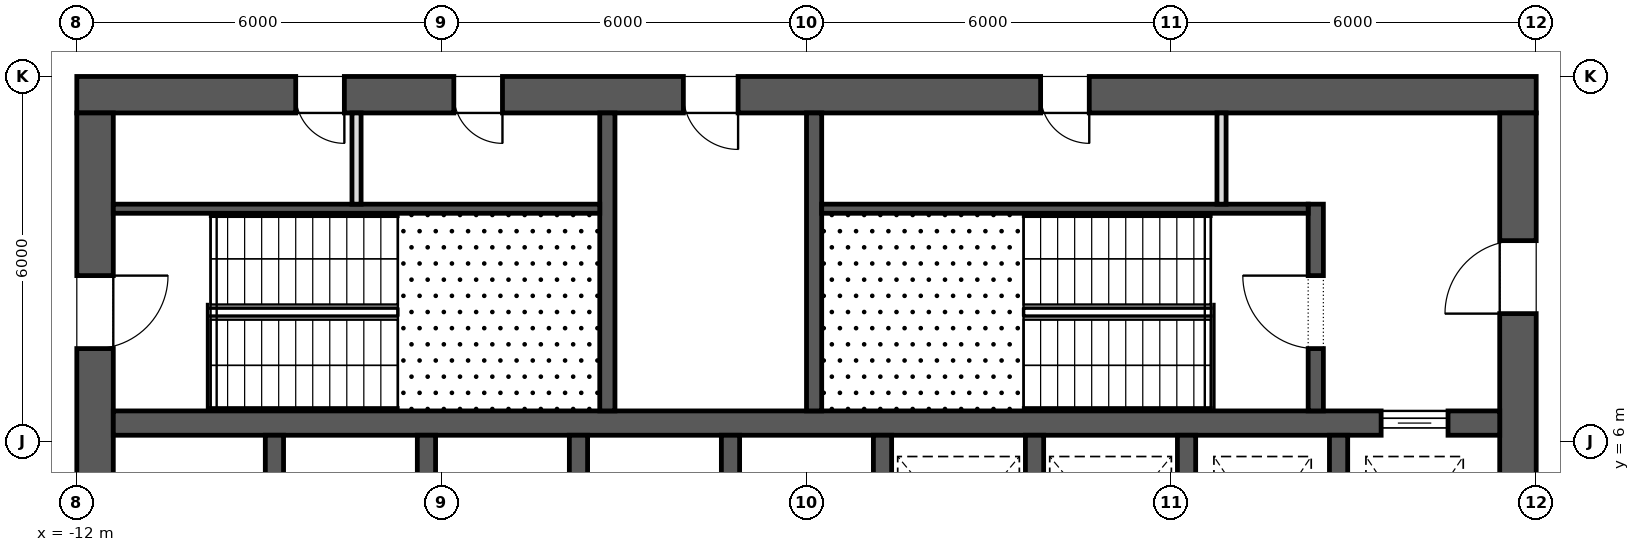
"""IFC4 building model, lengths in metres.
Left out: names, types, materials, properties, quantities, classifications, styles, units other than length and angle.
Written with IfcOpenShell. Run it as: python <this file> out.ifc"""

import sys

from ifc_helpers import new_model, si_unit, direction, frame, frame_2d, origin, place, context, subcontext, project, spatial, rectangle, extrude, element, fill, save


model = new_model("IFC4")
c1 = context("Model", 3, precision=1e-05, world=origin(), true_north=direction((0.0, 1.0)))
c2 = subcontext(c1, "Body", "Model", "MODEL_VIEW")
j1 = project(units=[si_unit("LENGTHUNIT", "METRE"), si_unit("PLANEANGLEUNIT", "RADIAN")], contexts=[c1])
p1 = place(None, origin())
s1 = spatial("IfcSite", under=j1, at=p1, CompositionType="ELEMENT")
p2 = place(p1, origin())
s2 = spatial("IfcBuilding", under=s1, at=p2, CompositionType="ELEMENT")
p3 = place(p2, frame((0.0, 0.0, 163.3)))
s3 = spatial("IfcBuildingStorey", under=s2, at=p3, CompositionType="ELEMENT", Elevation=163.3)
p4 = place(p3, frame((-12.0, 11.7, 0.0), z_axis=(0.0, 0.0, 1.0), x_axis=(1.0, 0.0, 0.0)))
e1 = element("IfcWall", 1, at=p4, inside=s3, PredefinedType="SHEAR", context=c2, shape_type="SweptSolid", body=[
    extrude(rectangle(XDim=24.0, YDim=0.6, at=frame_2d((12.0, 0.0))), origin(), (0.0, 0.0, 1.0), 4.2),
])
p5 = place(p4, frame((9.975, 0.0, 0.0)))
e2 = element("IfcOpeningElement", 2, at=p5, cuts=e1, PredefinedType="OPENING", context=c2, shape_type="SweptSolid", body=[
    extrude(rectangle(XDim=0.9, YDim=2.1, at=frame_2d((0.45, 1.05))), frame((0.0, 0.312, 0.0), z_axis=(0.0, -1.0, 0.0), x_axis=(1.0, 0.0, 0.0)), (0.0, 0.0, 1.0), 0.624),
])
p6 = place(p4, frame((3.6, 0.0, 0.0)))
e3 = element("IfcOpeningElement", 3, at=p6, cuts=e1, PredefinedType="OPENING", context=c2, shape_type="SweptSolid", body=[
    extrude(rectangle(XDim=0.8, YDim=2.1, at=frame_2d((0.4, 1.05))), frame((0.0, 0.312, 0.0), z_axis=(0.0, -1.0, 0.0), x_axis=(1.0, 0.0, 0.0)), (0.0, 0.0, 1.0), 0.624),
])
p7 = place(p4, frame((6.2, 0.0, 0.0)))
e4 = element("IfcOpeningElement", 4, at=p7, cuts=e1, PredefinedType="OPENING", context=c2, shape_type="SweptSolid", body=[
    extrude(rectangle(XDim=0.8, YDim=2.1, at=frame_2d((0.4, 1.05))), frame((0.0, 0.312, 0.0), z_axis=(0.0, -1.0, 0.0), x_axis=(1.0, 0.0, 0.0)), (0.0, 0.0, 1.0), 0.624),
])
p8 = place(p4, frame((15.85, 0.0, 0.0)))
e5 = element("IfcOpeningElement", 5, at=p8, cuts=e1, PredefinedType="OPENING", context=c2, shape_type="SweptSolid", body=[
    extrude(rectangle(XDim=0.8, YDim=2.1, at=frame_2d((0.4, 1.05))), frame((0.0, 0.312, 0.0), z_axis=(0.0, -1.0, 0.0), x_axis=(1.0, 0.0, 0.0)), (0.0, 0.0, 1.0), 0.624),
])
p9 = place(p3, frame((11.7, -11.4, 0.0), z_axis=(0.0, 0.0, 1.0), x_axis=(0.0, 1.0, 0.0)))
e6 = element("IfcWall", 6, at=p9, inside=s3, PredefinedType="SHEAR", context=c2, shape_type="SweptSolid", body=[
    extrude(rectangle(XDim=22.8, YDim=0.6, at=frame_2d((11.4, 0.0))), origin(), (0.0, 0.0, 1.0), 4.2),
])
p10 = place(p9, frame((10.2, 0.0, 0.0)))
e7 = element("IfcOpeningElement", 7, at=p10, cuts=e6, PredefinedType="OPENING", context=c2, shape_type="SweptSolid", body=[
    extrude(rectangle(XDim=2.4, YDim=2.1, at=frame_2d((1.2, 1.05))), frame((0.0, 0.312, 0.0), z_axis=(0.0, -1.0, 0.0), x_axis=(1.0, 0.0, 0.0)), (0.0, 0.0, 1.0), 0.624),
])
p11 = place(p9, frame((19.5, 0.0, 0.0)))
e8 = element("IfcOpeningElement", 8, at=p11, cuts=e6, PredefinedType="OPENING", context=c2, shape_type="SweptSolid", body=[
    extrude(rectangle(XDim=1.2, YDim=2.1, at=frame_2d((0.6, 1.05))), frame((0.0, 0.312, 0.0), z_axis=(0.0, -1.0, 0.0), x_axis=(1.0, 0.0, 0.0)), (0.0, 0.0, 1.0), 0.624),
])
p12 = place(p9, frame((2.1, 0.0, 0.0)))
e9 = element("IfcOpeningElement", 9, at=p12, cuts=e6, PredefinedType="OPENING", context=c2, shape_type="SweptSolid", body=[
    extrude(rectangle(XDim=1.2, YDim=2.1, at=frame_2d((0.6, 1.05))), frame((0.0, 0.312, 0.0), z_axis=(0.0, -1.0, 0.0), x_axis=(1.0, 0.0, 0.0)), (0.0, 0.0, 1.0), 0.624),
])
p13 = place(p3, frame((-11.7, -11.4, 0.0), z_axis=(0.0, 0.0, 1.0), x_axis=(0.0, 1.0, 0.0)))
e10 = element("IfcWall", 10, at=p13, inside=s3, PredefinedType="SHEAR", context=c2, shape_type="SweptSolid", body=[
    extrude(rectangle(XDim=22.8, YDim=0.6, at=frame_2d((11.4, 0.0))), origin(), (0.0, 0.0, 1.0), 4.2),
])
p14 = place(p13, frame((10.2, 0.0, 0.0)))
e11 = element("IfcOpeningElement", 11, at=p14, cuts=e10, PredefinedType="OPENING", context=c2, shape_type="SweptSolid", body=[
    extrude(rectangle(XDim=2.4, YDim=2.1, at=frame_2d((1.2, 1.05))), frame((0.0, 0.312, 0.0), z_axis=(0.0, -1.0, 0.0), x_axis=(1.0, 0.0, 0.0)), (0.0, 0.0, 1.0), 0.624),
])
p15 = place(p13, frame((18.925, 0.0, 0.0)))
e12 = element("IfcOpeningElement", 12, at=p15, cuts=e10, PredefinedType="OPENING", context=c2, shape_type="SweptSolid", body=[
    extrude(rectangle(XDim=1.2, YDim=2.1, at=frame_2d((0.6, 1.05))), frame((0.0, 0.312, 0.0), z_axis=(0.0, -1.0, 0.0), x_axis=(1.0, 0.0, 0.0)), (0.0, 0.0, 1.0), 0.624),
])
p16 = place(p13, frame((2.675, 0.0, 0.0)))
e13 = element("IfcOpeningElement", 13, at=p16, cuts=e10, PredefinedType="OPENING", context=c2, shape_type="SweptSolid", body=[
    extrude(rectangle(XDim=1.2, YDim=2.1, at=frame_2d((0.6, 1.05))), frame((0.0, 0.312, 0.0), z_axis=(0.0, -1.0, 0.0), x_axis=(1.0, 0.0, 0.0)), (0.0, 0.0, 1.0), 0.624),
])
p17 = place(p3, frame((-11.4, 6.3, 0.0), z_axis=(0.0, 0.0, 1.0), x_axis=(1.0, 0.0, 0.0)))
e14 = element("IfcWall", 14, at=p17, inside=s3, PredefinedType="SHEAR", context=c2, shape_type="SweptSolid", body=[
    extrude(rectangle(XDim=22.8, YDim=0.4, at=frame_2d((11.4, 0.0))), origin(), (0.0, 0.0, 1.0), 4.2),
])
p18 = place(p17, frame((20.85, 0.0, 0.0)))
e15 = element("IfcOpeningElement", 15, at=p18, cuts=e14, PredefinedType="OPENING", context=c2, shape_type="SweptSolid", body=[
    extrude(rectangle(XDim=1.1, YDim=2.1, at=frame_2d((0.55, 1.05))), frame((0.0, 0.212, 0.0), z_axis=(0.0, -1.0, 0.0), x_axis=(1.0, 0.0, 0.0)), (0.0, 0.0, 1.0), 0.424),
])
for number, where, z_axis, x_axis in (
    (16, (-8.75, 3.2, 0.0), (0.0, 0.0, 1.0), (0.0, 1.0, 0.0)),
    (17, (-6.25, 3.2, 0.0), (0.0, 0.0, 1.0), (0.0, 1.0, 0.0)),
    (18, (-3.75, 3.2, 0.0), (0.0, 0.0, 1.0), (0.0, 1.0, 0.0)),
    (19, (-1.25, 3.2, 0.0), (0.0, 0.0, 1.0), (0.0, 1.0, 0.0)),
    (20, (1.25, 3.2, 0.0), (0.0, 0.0, 1.0), (0.0, 1.0, 0.0)),
    (21, (3.75, 3.2, 0.0), (0.0, 0.0, 1.0), (0.0, 1.0, 0.0)),
    (22, (6.25, 3.2, 0.0), (0.0, 0.0, 1.0), (0.0, 1.0, 0.0)),
    (23, (8.75, 3.2, 0.0), (0.0, 0.0, 1.0), (0.0, 1.0, 0.0)),
):
    element("IfcWall", number, at=place(p3, frame(where, z_axis=z_axis, x_axis=x_axis)), inside=s3, PredefinedType="SHEAR", context=c2, shape_type="SweptSolid", body=[
        extrude(rectangle(XDim=2.9, YDim=0.3, at=frame_2d((1.45, 0.0))), origin(), (0.0, 0.0, 1.0), 4.2),
    ])
for number, where, z_axis, x_axis in (
    (24, (-3.275, 6.5, 0.0), (0.0, 0.0, 1.0), (0.0, 1.0, 0.0)),
    (25, (0.125, 6.5, 0.0), (0.0, 0.0, 1.0), (0.0, 1.0, 0.0)),
):
    element("IfcWall", number, at=place(p3, frame(where, z_axis=z_axis, x_axis=x_axis)), inside=s3, PredefinedType="SHEAR", context=c2, shape_type="SweptSolid", body=[
        extrude(rectangle(XDim=4.9, YDim=0.25, at=frame_2d((2.45, 0.0))), origin(), (0.0, 0.0, 1.0), 3.85),
    ])
p19 = place(p3, frame((8.375, 6.5, 0.0), z_axis=(0.0, 0.0, 1.0), x_axis=(0.0, 1.0, 0.0)))
e26 = element("IfcWall", 26, at=p19, inside=s3, PredefinedType="SHEAR", context=c2, shape_type="SweptSolid", body=[
    extrude(rectangle(XDim=3.4, YDim=0.25, at=frame_2d((1.7, 0.0))), origin(), (0.0, 0.0, 1.0), 3.85),
])
p20 = place(p19, frame((1.025, 0.0, 0.0)))
e27 = element("IfcOpeningElement", 27, at=p20, cuts=e26, PredefinedType="OPENING", context=c2, shape_type="SweptSolid", body=[
    extrude(rectangle(XDim=1.2, YDim=2.1, at=frame_2d((0.6, 1.05))), frame((0.0, 0.137, 0.0), z_axis=(0.0, -1.0, 0.0), x_axis=(1.0, 0.0, 0.0)), (0.0, 0.0, 1.0), 0.274),
])
for number, where, z_axis, x_axis in (
    (28, (-11.4, 9.825, 0.0), (0.0, 0.0, 1.0), (1.0, 0.0, 0.0)),
    (29, (0.25, 9.825, 0.0), (0.0, 0.0, 1.0), (1.0, 0.0, 0.0)),
):
    element("IfcWall", number, at=place(p3, frame(where, z_axis=z_axis, x_axis=x_axis)), inside=s3, PredefinedType="SHEAR", context=c2, shape_type="SweptSolid", body=[
        extrude(rectangle(XDim=8.0, YDim=0.15, at=frame_2d((4.0, 0.0))), origin(), (0.0, 0.0, 1.0), 3.85),
    ])
for number, where, z_axis, x_axis in (
    (30, (-7.4, 9.9, 0.0), (0.0, 0.0, 1.0), (0.0, 1.0, 0.0)),
    (31, (6.825, 9.9, 0.0), (0.0, 0.0, 1.0), (0.0, 1.0, 0.0)),
):
    element("IfcWall", number, at=place(p3, frame(where, z_axis=z_axis, x_axis=x_axis)), inside=s3, PredefinedType="PARTITIONING", context=c2, shape_type="SweptSolid", body=[
        extrude(rectangle(XDim=1.5, YDim=0.15, at=frame_2d((0.75, 0.0))), origin(), (0.0, 0.0, 1.0), 3.85),
    ])
p21 = place(p18, origin())
e32 = element("IfcDoor", 32, at=p21, inside=s3, OperationType="SLIDING_TO_LEFT", PredefinedType="DOOR", context=c2, shape_type="SweptSolid", body=[
    extrude(rectangle(XDim=1.1, YDim=2.1, at=frame_2d((0.55, 1.05))), frame((0.0, 0.025, 0.0), z_axis=(0.0, -1.0, 0.0), x_axis=(1.0, 0.0, 0.0)), (0.0, 0.0, 1.0), 0.05),
])
fill(e15, e32)
p22 = place(p15, frame((1.2, 0.0, 0.0), z_axis=(0.0, 0.0, 1.0), x_axis=(-1.0, 0.0, 0.0)))
e33 = element("IfcDoor", 33, at=p22, inside=s3, OperationType="SINGLE_SWING_RIGHT", PredefinedType="DOOR", context=c2, shape_type="SweptSolid", body=[
    extrude(rectangle(XDim=1.2, YDim=2.1, at=frame_2d((0.6, 1.05))), frame((0.0, 0.025, 0.0), z_axis=(0.0, -1.0, 0.0), x_axis=(1.0, 0.0, 0.0)), (0.0, 0.0, 1.0), 0.05),
])
fill(e12, e33)
p23 = place(p20, origin())
e34 = element("IfcDoor", 34, at=p23, inside=s3, OperationType="SINGLE_SWING_LEFT", PredefinedType="DOOR", context=c2, shape_type="SweptSolid", body=[
    extrude(rectangle(XDim=1.2, YDim=2.1, at=frame_2d((0.6, 1.05))), frame((0.0, 0.025, 0.0), z_axis=(0.0, -1.0, 0.0), x_axis=(1.0, 0.0, 0.0)), (0.0, 0.0, 1.0), 0.05),
])
fill(e27, e34)
p24 = place(p11, origin())
e35 = element("IfcDoor", 35, at=p24, inside=s3, OperationType="SINGLE_SWING_RIGHT", PredefinedType="DOOR", context=c2, shape_type="SweptSolid", body=[
    extrude(rectangle(XDim=1.2, YDim=2.1, at=frame_2d((0.6, 1.05))), frame((0.0, 0.025, 0.0), z_axis=(0.0, -1.0, 0.0), x_axis=(1.0, 0.0, 0.0)), (0.0, 0.0, 1.0), 0.05),
])
fill(e8, e35)
p25 = place(p5, frame((0.9, 0.0, 0.0), z_axis=(0.0, 0.0, 1.0), x_axis=(-1.0, 0.0, 0.0)))
e36 = element("IfcDoor", 36, at=p25, inside=s3, OperationType="SINGLE_SWING_RIGHT", PredefinedType="DOOR", context=c2, shape_type="SweptSolid", body=[
    extrude(rectangle(XDim=0.9, YDim=2.1, at=frame_2d((0.45, 1.05))), frame((0.0, 0.025, 0.0), z_axis=(0.0, -1.0, 0.0), x_axis=(1.0, 0.0, 0.0)), (0.0, 0.0, 1.0), 0.05),
])
fill(e2, e36)
p26 = place(p6, frame((0.8, 0.0, 0.0), z_axis=(0.0, 0.0, 1.0), x_axis=(-1.0, 0.0, 0.0)))
e37 = element("IfcDoor", 37, at=p26, inside=s3, OperationType="SINGLE_SWING_RIGHT", PredefinedType="DOOR", context=c2, shape_type="SweptSolid", body=[
    extrude(rectangle(XDim=0.8, YDim=2.1, at=frame_2d((0.4, 1.05))), frame((0.0, 0.025, 0.0), z_axis=(0.0, -1.0, 0.0), x_axis=(1.0, 0.0, 0.0)), (0.0, 0.0, 1.0), 0.05),
])
fill(e3, e37)
p27 = place(p7, frame((0.8, 0.0, 0.0), z_axis=(0.0, 0.0, 1.0), x_axis=(-1.0, 0.0, 0.0)))
e38 = element("IfcDoor", 38, at=p27, inside=s3, OperationType="SINGLE_SWING_RIGHT", PredefinedType="DOOR", context=c2, shape_type="SweptSolid", body=[
    extrude(rectangle(XDim=0.8, YDim=2.1, at=frame_2d((0.4, 1.05))), frame((0.0, 0.025, 0.0), z_axis=(0.0, -1.0, 0.0), x_axis=(1.0, 0.0, 0.0)), (0.0, 0.0, 1.0), 0.05),
])
fill(e4, e38)
p28 = place(p8, frame((0.8, 0.0, 0.0), z_axis=(0.0, 0.0, 1.0), x_axis=(-1.0, 0.0, 0.0)))
e39 = element("IfcDoor", 39, at=p28, inside=s3, OperationType="SINGLE_SWING_RIGHT", PredefinedType="DOOR", context=c2, shape_type="SweptSolid", body=[
    extrude(rectangle(XDim=0.8, YDim=2.1, at=frame_2d((0.4, 1.05))), frame((0.0, 0.025, 0.0), z_axis=(0.0, -1.0, 0.0), x_axis=(1.0, 0.0, 0.0)), (0.0, 0.0, 1.0), 0.05),
])
fill(e5, e39)
save(model, sys.argv[1])
